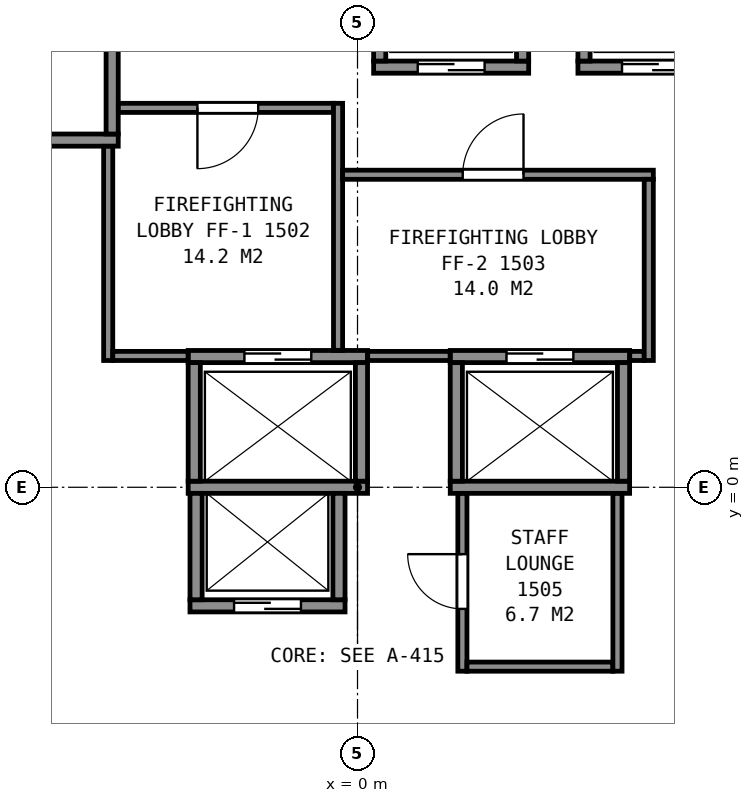
"""IFC4 building model, lengths in metres.
Left out: names, types, materials, properties, quantities, classifications, styles, units other than length and angle.
Written with IfcOpenShell. Run it as: python <this file> out.ifc"""

import sys

from ifc_helpers import new_model, si_unit, direction, frame, frame_2d, origin, place, context, subcontext, project, spatial, rectangle, extrude, element, fill, save


model = new_model("IFC4")
c1 = context("Model", 3, precision=1e-05, world=origin(), true_north=direction((0.0, 1.0)))
c2 = subcontext(c1, "Body", "Model", "MODEL_VIEW")
j1 = project(units=[si_unit("LENGTHUNIT", "METRE"), si_unit("PLANEANGLEUNIT", "RADIAN")], contexts=[c1])
p1 = place(None, origin())
s1 = spatial("IfcSite", under=j1, at=p1, CompositionType="ELEMENT")
p2 = place(p1, origin())
s2 = spatial("IfcBuilding", under=s1, at=p2, CompositionType="ELEMENT")
p3 = place(p2, frame((0.0, 0.0, 69.2)))
s3 = spatial("IfcBuildingStorey", under=s2, at=p3, CompositionType="ELEMENT", Elevation=69.2)
p4 = place(p3, frame((-2.755, -1.95, 0.0), z_axis=(0.0, 0.0, 1.0), x_axis=(1.0, 0.0, 0.0)))
e1 = element("IfcWall", 1, at=p4, inside=s3, PredefinedType="PARTITIONING", context=c2, shape_type="SweptSolid", body=[
    extrude(rectangle(XDim=2.55, YDim=0.2, at=frame_2d((1.275, 0.0))), origin(), (0.0, 0.0, 1.0), 3.6),
])
p5 = place(p4, frame((0.725, 0.0, 0.0)))
e2 = element("IfcOpeningElement", 2, at=p5, cuts=e1, PredefinedType="OPENING", context=c2, shape_type="SweptSolid", body=[
    extrude(rectangle(XDim=1.1, YDim=2.1, at=frame_2d((0.55, 1.05))), frame((0.0, 0.11, 0.0), z_axis=(0.0, -1.0, 0.0), x_axis=(1.0, 0.0, 0.0)), (0.0, 0.0, 1.0), 0.22),
])
p6 = place(p3, frame((-2.785, 0.0, 0.0), z_axis=(0.0, 0.0, 1.0), x_axis=(1.0, 0.0, 0.0)))
e3 = element("IfcWall", 3, at=p6, inside=s3, PredefinedType="PARTITIONING", context=c2, shape_type="SweptSolid", body=[
    extrude(rectangle(XDim=2.95, YDim=0.2, at=frame_2d((1.475, 0.0))), origin(), (0.0, 0.0, 1.0), 3.6),
])
p7 = place(p3, frame((1.525, 0.0, 0.0), z_axis=(0.0, 0.0, 1.0), x_axis=(1.0, 0.0, 0.0)))
e4 = element("IfcWall", 4, at=p7, inside=s3, PredefinedType="PARTITIONING", context=c2, shape_type="SweptSolid", body=[
    extrude(rectangle(XDim=2.95, YDim=0.2, at=frame_2d((1.475, 0.0))), origin(), (0.0, 0.0, 1.0), 3.6),
])
p8 = place(p3, frame((-2.785, 2.15, 0.0), z_axis=(0.0, 0.0, 1.0), x_axis=(1.0, 0.0, 0.0)))
e5 = element("IfcWall", 5, at=p8, inside=s3, PredefinedType="PARTITIONING", context=c2, shape_type="SweptSolid", body=[
    extrude(rectangle(XDim=2.95, YDim=0.2, at=frame_2d((1.475, 0.0))), origin(), (0.0, 0.0, 1.0), 3.6),
])
p9 = place(p8, frame((0.925, 0.0, 0.0)))
e6 = element("IfcOpeningElement", 6, at=p9, cuts=e5, PredefinedType="OPENING", context=c2, shape_type="SweptSolid", body=[
    extrude(rectangle(XDim=1.1, YDim=2.1, at=frame_2d((0.55, 1.05))), frame((0.0, 0.11, 0.0), z_axis=(0.0, -1.0, 0.0), x_axis=(1.0, 0.0, 0.0)), (0.0, 0.0, 1.0), 0.22),
])
p10 = place(p3, frame((1.525, 2.15, 0.0), z_axis=(0.0, 0.0, 1.0), x_axis=(1.0, 0.0, 0.0)))
e7 = element("IfcWall", 7, at=p10, inside=s3, PredefinedType="PARTITIONING", context=c2, shape_type="SweptSolid", body=[
    extrude(rectangle(XDim=2.95, YDim=0.2, at=frame_2d((1.475, 0.0))), origin(), (0.0, 0.0, 1.0), 3.6),
])
p11 = place(p10, frame((0.925, 0.0, 0.0)))
e8 = element("IfcOpeningElement", 8, at=p11, cuts=e7, PredefinedType="OPENING", context=c2, shape_type="SweptSolid", body=[
    extrude(rectangle(XDim=1.1, YDim=2.1, at=frame_2d((0.55, 1.05))), frame((0.0, 0.11, 0.0), z_axis=(0.0, -1.0, 0.0), x_axis=(1.0, 0.0, 0.0)), (0.0, 0.0, 1.0), 0.22),
])
p12 = place(p3, frame((-6.285, 5.71, 0.0), z_axis=(0.0, 0.0, 1.0), x_axis=(1.0, 0.0, 0.0)))
e9 = element("IfcWall", 9, at=p12, inside=s3, PredefinedType="PARTITIONING", context=c2, shape_type="SweptSolid", body=[
    extrude(rectangle(XDim=2.35, YDim=0.2, at=frame_2d((1.175, 0.0))), origin(), (0.0, 0.0, 1.0), 3.6),
])
p13 = place(p3, frame((0.265, 6.91, 0.0), z_axis=(0.0, 0.0, 1.0), x_axis=(1.0, 0.0, 0.0)))
e10 = element("IfcWall", 10, at=p13, inside=s3, PredefinedType="PARTITIONING", context=c2, shape_type="SweptSolid", body=[
    extrude(rectangle(XDim=2.55, YDim=0.2, at=frame_2d((1.275, 0.0))), origin(), (0.0, 0.0, 1.0), 3.6),
])
p14 = place(p13, frame((0.725, 0.0, 0.0)))
e11 = element("IfcOpeningElement", 11, at=p14, cuts=e10, PredefinedType="OPENING", context=c2, shape_type="SweptSolid", body=[
    extrude(rectangle(XDim=1.1, YDim=2.1, at=frame_2d((0.55, 1.05))), frame((0.0, 0.11, 0.0), z_axis=(0.0, -1.0, 0.0), x_axis=(1.0, 0.0, 0.0)), (0.0, 0.0, 1.0), 0.22),
])
p15 = place(p3, frame((3.625, 6.91, 0.0), z_axis=(0.0, 0.0, 1.0), x_axis=(1.0, 0.0, 0.0)))
e12 = element("IfcWall", 12, at=p15, inside=s3, PredefinedType="PARTITIONING", context=c2, shape_type="SweptSolid", body=[
    extrude(rectangle(XDim=2.55, YDim=0.2, at=frame_2d((1.275, 0.0))), origin(), (0.0, 0.0, 1.0), 3.6),
])
p16 = place(p15, frame((0.725, 0.0, 0.0)))
e13 = element("IfcOpeningElement", 13, at=p16, cuts=e12, PredefinedType="OPENING", context=c2, shape_type="SweptSolid", body=[
    extrude(rectangle(XDim=1.1, YDim=2.1, at=frame_2d((0.55, 1.05))), frame((0.0, 0.11, 0.0), z_axis=(0.0, -1.0, 0.0), x_axis=(1.0, 0.0, 0.0)), (0.0, 0.0, 1.0), 0.22),
])
p17 = place(p3, frame((4.375, 0.1, 0.0), z_axis=(0.0, 0.0, 1.0), x_axis=(0.0, 1.0, 0.0)))
e14 = element("IfcWall", 14, at=p17, inside=s3, PredefinedType="PARTITIONING", context=c2, shape_type="SweptSolid", body=[
    extrude(rectangle(XDim=1.95, YDim=0.2, at=frame_2d((0.975, 0.0))), origin(), (0.0, 0.0, 1.0), 3.6),
])
for number, where, z_axis, x_axis in (
    (15, (3.725, 7.01, 0.0), (0.0, 0.0, 1.0), (0.0, 1.0, 0.0)),
    (16, (2.715, 7.01, 0.0), (0.0, 0.0, 1.0), (0.0, 1.0, 0.0)),
):
    element("IfcWall", number, at=place(p3, frame(where, z_axis=z_axis, x_axis=x_axis)), inside=s3, PredefinedType="PARTITIONING", context=c2, shape_type="SweptSolid", body=[
        extrude(rectangle(XDim=1.75, YDim=0.2, at=frame_2d((0.875, 0.0))), origin(), (0.0, 0.0, 1.0), 3.6),
    ])
p18 = place(p3, frame((1.625, 0.1, 0.0), z_axis=(0.0, 0.0, 1.0), x_axis=(0.0, 1.0, 0.0)))
e17 = element("IfcWall", 17, at=p18, inside=s3, PredefinedType="PARTITIONING", context=c2, shape_type="SweptSolid", body=[
    extrude(rectangle(XDim=1.95, YDim=0.2, at=frame_2d((0.975, 0.0))), origin(), (0.0, 0.0, 1.0), 3.6),
])
p19 = place(p3, frame((0.365, 7.01, 0.0), z_axis=(0.0, 0.0, 1.0), x_axis=(0.0, 1.0, 0.0)))
e18 = element("IfcWall", 18, at=p19, inside=s3, PredefinedType="PARTITIONING", context=c2, shape_type="SweptSolid", body=[
    extrude(rectangle(XDim=1.75, YDim=0.2, at=frame_2d((0.875, 0.0))), origin(), (0.0, 0.0, 1.0), 3.6),
])
p20 = place(p3, frame((0.065, 0.1, 0.0), z_axis=(0.0, 0.0, 1.0), x_axis=(0.0, 1.0, 0.0)))
e19 = element("IfcWall", 19, at=p20, inside=s3, PredefinedType="PARTITIONING", context=c2, shape_type="SweptSolid", body=[
    extrude(rectangle(XDim=1.95, YDim=0.2, at=frame_2d((0.975, 0.0))), origin(), (0.0, 0.0, 1.0), 3.6),
])
for number, where, z_axis, x_axis in (
    (20, (-0.305, -1.85, 0.0), (0.0, 0.0, 1.0), (0.0, 1.0, 0.0)),
    (21, (-2.655, -1.85, 0.0), (0.0, 0.0, 1.0), (0.0, 1.0, 0.0)),
):
    element("IfcWall", number, at=place(p3, frame(where, z_axis=z_axis, x_axis=x_axis)), inside=s3, PredefinedType="PARTITIONING", context=c2, shape_type="SweptSolid", body=[
        extrude(rectangle(XDim=1.75, YDim=0.2, at=frame_2d((0.875, 0.0))), origin(), (0.0, 0.0, 1.0), 3.6),
    ])
p21 = place(p3, frame((-2.685, 0.1, 0.0), z_axis=(0.0, 0.0, 1.0), x_axis=(0.0, 1.0, 0.0)))
e22 = element("IfcWall", 22, at=p21, inside=s3, PredefinedType="PARTITIONING", context=c2, shape_type="SweptSolid", body=[
    extrude(rectangle(XDim=1.95, YDim=0.2, at=frame_2d((0.975, 0.0))), origin(), (0.0, 0.0, 1.0), 3.6),
])
p22 = place(p3, frame((-4.035, 5.81, 0.0), z_axis=(0.0, 0.0, 1.0), x_axis=(0.0, 1.0, 0.0)))
e23 = element("IfcWall", 23, at=p22, inside=s3, PredefinedType="PARTITIONING", context=c2, shape_type="SweptSolid", body=[
    extrude(rectangle(XDim=1.75, YDim=0.2, at=frame_2d((0.875, 0.0))), origin(), (0.0, 0.0, 1.0), 3.6),
])
p23 = place(p3, frame((-13.664, 5.946, 0.0), z_axis=(0.0, 0.0, 1.0), x_axis=(0.499994327219, -0.866028678941, 0.0)))
e24 = element("IfcWall", 24, at=p23, inside=s3, PredefinedType="PARTITIONING", context=c2, shape_type="SweptSolid", body=[
    extrude(rectangle(XDim=23.968, YDim=0.2, at=frame_2d((11.984, 0.0))), origin(), (0.0, 0.0, 1.0), 3.35),
])
p24 = place(p3, frame((-4.152, -5.729, 0.0), z_axis=(0.0, 0.0, 1.0), x_axis=(-0.500024287448, 0.866011380966, 0.0)))
e25 = element("IfcWall", 25, at=p24, inside=s3, PredefinedType="PARTITIONING", context=c2, shape_type="SweptSolid", body=[
    extrude(rectangle(XDim=3.501, YDim=0.15, at=frame_2d((1.75, 0.0))), origin(), (0.0, 0.0, 1.0), 3.35),
])
p25 = place(p24, frame((2.026, 0.0, 0.0)))
e26 = element("IfcOpeningElement", 26, at=p25, cuts=e25, PredefinedType="OPENING", context=c2, shape_type="SweptSolid", body=[
    extrude(rectangle(XDim=0.9, YDim=2.1, at=frame_2d((0.45, 1.05))), frame((0.0, 0.085, 0.0), z_axis=(0.0, -1.0, 0.0), x_axis=(1.0, 0.0, 0.0)), (0.0, 0.0, 1.0), 0.17),
])
p26 = place(p24, frame((0.248, 0.0, 0.0)))
e27 = element("IfcOpeningElement", 27, at=p26, cuts=e25, PredefinedType="OPENING", context=c2, shape_type="SweptSolid", body=[
    extrude(rectangle(XDim=0.9, YDim=2.1, at=frame_2d((0.45, 1.05))), frame((0.0, 0.085, 0.0), z_axis=(0.0, -1.0, 0.0), x_axis=(1.0, 0.0, 0.0)), (0.0, 0.0, 1.0), 0.17),
])
p27 = place(p3, frame((-4.1, 2.085, 0.0), z_axis=(0.0, 0.0, 1.0), x_axis=(0.0, 1.0, 0.0)))
e28 = element("IfcWall", 28, at=p27, inside=s3, PredefinedType="PARTITIONING", context=c2, shape_type="SweptSolid", body=[
    extrude(rectangle(XDim=3.523, YDim=0.15, at=frame_2d((1.761, 0.0))), origin(), (0.0, 0.0, 1.0), 3.35),
])
p28 = place(p3, frame((-4.025, 2.16, 0.0), z_axis=(0.0, 0.0, 1.0), x_axis=(1.0, 0.0, 0.0)))
e29 = element("IfcWall", 29, at=p28, inside=s3, PredefinedType="PARTITIONING", context=c2, shape_type="SweptSolid", body=[
    extrude(rectangle(XDim=1.238, YDim=0.15, at=frame_2d((0.619, 0.0))), origin(), (0.0, 0.0, 1.0), 3.35),
])
p29 = place(p3, frame((-3.933, 6.24, 0.0), z_axis=(0.0, 0.0, 1.0), x_axis=(1.0, 0.0, 0.0)))
e30 = element("IfcWall", 30, at=p29, inside=s3, PredefinedType="PARTITIONING", context=c2, shape_type="SweptSolid", body=[
    extrude(rectangle(XDim=3.538, YDim=0.15, at=frame_2d((1.769, 0.0))), origin(), (0.0, 0.0, 1.0), 3.35),
])
p30 = place(p29, frame((1.3, 0.0, 0.0)))
e31 = element("IfcOpeningElement", 31, at=p30, cuts=e30, PredefinedType="OPENING", context=c2, shape_type="SweptSolid", body=[
    extrude(rectangle(XDim=1.0, YDim=2.1, at=frame_2d((0.5, 1.05))), frame((0.0, 0.085, 0.0), z_axis=(0.0, -1.0, 0.0), x_axis=(1.0, 0.0, 0.0)), (0.0, 0.0, 1.0), 0.17),
])
p31 = place(p3, frame((-0.32, 2.252, 0.0), z_axis=(0.0, 0.0, 1.0), x_axis=(0.0, 1.0, 0.0)))
e32 = element("IfcWall", 32, at=p31, inside=s3, PredefinedType="PARTITIONING", context=c2, shape_type="SweptSolid", body=[
    extrude(rectangle(XDim=4.063, YDim=0.15, at=frame_2d((2.031, 0.0))), origin(), (0.0, 0.0, 1.0), 3.35),
])
p32 = place(p3, frame((-0.245, 5.14, 0.0), z_axis=(0.0, 0.0, 1.0), x_axis=(1.0, 0.0, 0.0)))
e33 = element("IfcWall", 33, at=p32, inside=s3, PredefinedType="PARTITIONING", context=c2, shape_type="SweptSolid", body=[
    extrude(rectangle(XDim=5.11, YDim=0.15, at=frame_2d((2.555, 0.0))), origin(), (0.0, 0.0, 1.0), 3.35),
])
p33 = place(p32, frame((1.975, 0.0, 0.0)))
e34 = element("IfcOpeningElement", 34, at=p33, cuts=e33, PredefinedType="OPENING", context=c2, shape_type="SweptSolid", body=[
    extrude(rectangle(XDim=1.0, YDim=2.1, at=frame_2d((0.5, 1.05))), frame((0.0, 0.085, 0.0), z_axis=(0.0, -1.0, 0.0), x_axis=(1.0, 0.0, 0.0)), (0.0, 0.0, 1.0), 0.17),
])
p34 = place(p3, frame((0.167, 2.16, 0.0), z_axis=(0.0, 0.0, 1.0), x_axis=(1.0, 0.0, 0.0)))
e35 = element("IfcWall", 35, at=p34, inside=s3, PredefinedType="PARTITIONING", context=c2, shape_type="SweptSolid", body=[
    extrude(rectangle(XDim=1.356, YDim=0.15, at=frame_2d((0.678, 0.0))), origin(), (0.0, 0.0, 1.0), 3.35),
])
p35 = place(p3, frame((1.725, -0.102, 0.0), z_axis=(0.0, 0.0, 1.0), x_axis=(0.0, -1.0, 0.0)))
e36 = element("IfcWall", 36, at=p35, inside=s3, PredefinedType="PARTITIONING", context=c2, shape_type="SweptSolid", body=[
    extrude(rectangle(XDim=2.923, YDim=0.15, at=frame_2d((1.461, 0.0))), origin(), (0.0, 0.0, 1.0), 3.35),
])
p36 = place(p35, frame((0.998, 0.0, 0.0)))
e37 = element("IfcOpeningElement", 37, at=p36, cuts=e36, PredefinedType="OPENING", context=c2, shape_type="SweptSolid", body=[
    extrude(rectangle(XDim=0.9, YDim=2.1, at=frame_2d((0.45, 1.05))), frame((0.0, 0.085, 0.0), z_axis=(0.0, -1.0, 0.0), x_axis=(1.0, 0.0, 0.0)), (0.0, 0.0, 1.0), 0.17),
])
p37 = place(p3, frame((1.8, -2.95, 0.0), z_axis=(0.0, 0.0, 1.0), x_axis=(1.0, 0.0, 0.0)))
e38 = element("IfcWall", 38, at=p37, inside=s3, PredefinedType="PARTITIONING", context=c2, shape_type="SweptSolid", body=[
    extrude(rectangle(XDim=2.4, YDim=0.15, at=frame_2d((1.2, 0.0))), origin(), (0.0, 0.0, 1.0), 3.35),
])
p38 = place(p3, frame((4.275, -3.025, 0.0), z_axis=(0.0, 0.0, 1.0), x_axis=(0.0, 1.0, 0.0)))
e39 = element("IfcWall", 39, at=p38, inside=s3, PredefinedType="PARTITIONING", context=c2, shape_type="SweptSolid", body=[
    extrude(rectangle(XDim=2.923, YDim=0.15, at=frame_2d((1.461, 0.0))), origin(), (0.0, 0.0, 1.0), 3.35),
])
p39 = place(p3, frame((4.477, 2.16, 0.0), z_axis=(0.0, 0.0, 1.0), x_axis=(1.0, 0.0, 0.0)))
e40 = element("IfcWall", 40, at=p39, inside=s3, PredefinedType="PARTITIONING", context=c2, shape_type="SweptSolid", body=[
    extrude(rectangle(XDim=0.238, YDim=0.15, at=frame_2d((0.119, 0.0))), origin(), (0.0, 0.0, 1.0), 3.35),
])
p40 = place(p3, frame((4.79, 2.085, 0.0), z_axis=(0.0, 0.0, 1.0), x_axis=(0.0, 1.0, 0.0)))
e41 = element("IfcWall", 41, at=p40, inside=s3, PredefinedType="PARTITIONING", context=c2, shape_type="SweptSolid", body=[
    extrude(rectangle(XDim=2.98, YDim=0.15, at=frame_2d((1.49, 0.0))), origin(), (0.0, 0.0, 1.0), 3.35),
])
p41 = place(p3, frame((-3.766, -18.358, 0.0), z_axis=(0.0, 0.0, 1.0), x_axis=(-0.500003973642, 0.866023109589, 0.0)))
e42 = element("IfcWall", 42, at=p41, inside=s3, PredefinedType="PARTITIONING", context=c2, shape_type="SweptSolid", body=[
    extrude(rectangle(XDim=28.826, YDim=0.125, at=frame_2d((14.413, 0.0))), origin(), (0.0, 0.0, 1.0), 2.613),
])
p42 = place(p41, frame((27.114, 0.0, 0.0)))
e43 = element("IfcOpeningElement", 43, at=p42, cuts=e42, PredefinedType="OPENING", context=c2, shape_type="SweptSolid", body=[
    extrude(rectangle(XDim=0.9, YDim=2.1, at=frame_2d((0.45, 1.05))), frame((0.0, 0.073, 0.0), z_axis=(0.0, -1.0, 0.0), x_axis=(1.0, 0.0, 0.0)), (0.0, 0.0, 1.0), 0.145),
])
p43 = place(p41, frame((20.322, 0.0, 0.0)))
e44 = element("IfcOpeningElement", 44, at=p43, cuts=e42, PredefinedType="OPENING", context=c2, shape_type="SweptSolid", body=[
    extrude(rectangle(XDim=0.9, YDim=2.1, at=frame_2d((0.45, 1.05))), frame((0.0, 0.073, 0.0), z_axis=(0.0, -1.0, 0.0), x_axis=(1.0, 0.0, 0.0)), (0.0, 0.0, 1.0), 0.145),
])
p44 = place(p41, frame((17.68, 0.0, 0.0)))
e45 = element("IfcOpeningElement", 45, at=p44, cuts=e42, PredefinedType="OPENING", context=c2, shape_type="SweptSolid", body=[
    extrude(rectangle(XDim=0.9, YDim=2.1, at=frame_2d((0.45, 1.05))), frame((0.0, 0.073, 0.0), z_axis=(0.0, -1.0, 0.0), x_axis=(1.0, 0.0, 0.0)), (0.0, 0.0, 1.0), 0.145),
])
p45 = place(p41, frame((10.836, 0.0, 0.0)))
e46 = element("IfcOpeningElement", 46, at=p45, cuts=e42, PredefinedType="OPENING", context=c2, shape_type="SweptSolid", body=[
    extrude(rectangle(XDim=0.9, YDim=2.1, at=frame_2d((0.45, 1.05))), frame((0.0, 0.073, 0.0), z_axis=(0.0, -1.0, 0.0), x_axis=(1.0, 0.0, 0.0)), (0.0, 0.0, 1.0), 0.145),
])
p46 = place(p41, frame((7.342, 0.0, 0.0)))
e47 = element("IfcOpeningElement", 47, at=p46, cuts=e42, PredefinedType="OPENING", context=c2, shape_type="SweptSolid", body=[
    extrude(rectangle(XDim=0.9, YDim=2.1, at=frame_2d((0.45, 1.05))), frame((0.0, 0.073, 0.0), z_axis=(0.0, -1.0, 0.0), x_axis=(1.0, 0.0, 0.0)), (0.0, 0.0, 1.0), 0.145),
])
p47 = place(p3, frame((18.179, 6.606, 0.0), z_axis=(0.0, 0.0, 1.0), x_axis=(-0.500003973642, -0.866023109589, 0.0)))
e48 = element("IfcWall", 48, at=p47, inside=s3, PredefinedType="PARTITIONING", context=c2, shape_type="SweptSolid", body=[
    extrude(rectangle(XDim=28.826, YDim=0.125, at=frame_2d((14.413, 0.0))), origin(), (0.0, 0.0, 1.0), 2.613),
])
p48 = place(p47, frame((21.501, 0.0, 0.0)))
e49 = element("IfcOpeningElement", 49, at=p48, cuts=e48, PredefinedType="OPENING", context=c2, shape_type="SweptSolid", body=[
    extrude(rectangle(XDim=0.9, YDim=2.1, at=frame_2d((0.45, 1.05))), frame((0.0, 0.073, 0.0), z_axis=(0.0, -1.0, 0.0), x_axis=(1.0, 0.0, 0.0)), (0.0, 0.0, 1.0), 0.145),
])
p49 = place(p47, frame((18.894, 0.0, 0.0)))
e50 = element("IfcOpeningElement", 50, at=p49, cuts=e48, PredefinedType="OPENING", context=c2, shape_type="SweptSolid", body=[
    extrude(rectangle(XDim=0.9, YDim=2.1, at=frame_2d((0.45, 1.05))), frame((0.0, 0.073, 0.0), z_axis=(0.0, -1.0, 0.0), x_axis=(1.0, 0.0, 0.0)), (0.0, 0.0, 1.0), 0.145),
])
p50 = place(p47, frame((10.937, 0.0, 0.0)))
e51 = element("IfcOpeningElement", 51, at=p50, cuts=e48, PredefinedType="OPENING", context=c2, shape_type="SweptSolid", body=[
    extrude(rectangle(XDim=0.9, YDim=2.1, at=frame_2d((0.45, 1.05))), frame((0.0, 0.073, 0.0), z_axis=(0.0, -1.0, 0.0), x_axis=(1.0, 0.0, 0.0)), (0.0, 0.0, 1.0), 0.145),
])
p51 = place(p47, frame((7.535, 0.0, 0.0)))
e52 = element("IfcOpeningElement", 52, at=p51, cuts=e48, PredefinedType="OPENING", context=c2, shape_type="SweptSolid", body=[
    extrude(rectangle(XDim=0.9, YDim=2.1, at=frame_2d((0.45, 1.05))), frame((0.0, 0.073, 0.0), z_axis=(0.0, -1.0, 0.0), x_axis=(1.0, 0.0, 0.0)), (0.0, 0.0, 1.0), 0.145),
])
p52 = place(p47, frame((0.827, 0.0, 0.0)))
e53 = element("IfcOpeningElement", 53, at=p52, cuts=e48, PredefinedType="OPENING", context=c2, shape_type="SweptSolid", body=[
    extrude(rectangle(XDim=0.9, YDim=2.1, at=frame_2d((0.45, 1.05))), frame((0.0, 0.073, 0.0), z_axis=(0.0, -1.0, 0.0), x_axis=(1.0, 0.0, 0.0)), (0.0, 0.0, 1.0), 0.145),
])
p53 = place(p14, origin())
e54 = element("IfcDoor", 54, at=p53, inside=s3, OperationType="SLIDING_TO_LEFT", PredefinedType="DOOR", context=c2, shape_type="SweptSolid", body=[
    extrude(rectangle(XDim=1.1, YDim=2.1, at=frame_2d((0.55, 1.05))), frame((0.0, 0.025, 0.0), z_axis=(0.0, -1.0, 0.0), x_axis=(1.0, 0.0, 0.0)), (0.0, 0.0, 1.0), 0.05),
])
fill(e11, e54)
p54 = place(p5, origin())
e55 = element("IfcDoor", 55, at=p54, inside=s3, OperationType="SLIDING_TO_RIGHT", PredefinedType="DOOR", context=c2, shape_type="SweptSolid", body=[
    extrude(rectangle(XDim=1.1, YDim=2.1, at=frame_2d((0.55, 1.05))), frame((0.0, 0.025, 0.0), z_axis=(0.0, -1.0, 0.0), x_axis=(1.0, 0.0, 0.0)), (0.0, 0.0, 1.0), 0.05),
])
fill(e2, e55)
p55 = place(p16, origin())
e56 = element("IfcDoor", 56, at=p55, inside=s3, OperationType="SLIDING_TO_LEFT", PredefinedType="DOOR", context=c2, shape_type="SweptSolid", body=[
    extrude(rectangle(XDim=1.1, YDim=2.1, at=frame_2d((0.55, 1.05))), frame((0.0, 0.025, 0.0), z_axis=(0.0, -1.0, 0.0), x_axis=(1.0, 0.0, 0.0)), (0.0, 0.0, 1.0), 0.05),
])
fill(e13, e56)
p56 = place(p9, origin())
e57 = element("IfcDoor", 57, at=p56, inside=s3, OperationType="SLIDING_TO_LEFT", PredefinedType="DOOR", context=c2, shape_type="SweptSolid", body=[
    extrude(rectangle(XDim=1.1, YDim=2.1, at=frame_2d((0.55, 1.05))), frame((0.0, 0.025, 0.0), z_axis=(0.0, -1.0, 0.0), x_axis=(1.0, 0.0, 0.0)), (0.0, 0.0, 1.0), 0.05),
])
fill(e6, e57)
p57 = place(p11, origin())
e58 = element("IfcDoor", 58, at=p57, inside=s3, OperationType="SLIDING_TO_RIGHT", PredefinedType="DOOR", context=c2, shape_type="SweptSolid", body=[
    extrude(rectangle(XDim=1.1, YDim=2.1, at=frame_2d((0.55, 1.05))), frame((0.0, 0.025, 0.0), z_axis=(0.0, -1.0, 0.0), x_axis=(1.0, 0.0, 0.0)), (0.0, 0.0, 1.0), 0.05),
])
fill(e8, e58)
p58 = place(p30, origin())
e59 = element("IfcDoor", 59, at=p58, inside=s3, OperationType="SINGLE_SWING_LEFT", PredefinedType="DOOR", context=c2, shape_type="SweptSolid", body=[
    extrude(rectangle(XDim=1.0, YDim=2.1, at=frame_2d((0.5, 1.05))), frame((0.0, 0.025, 0.0), z_axis=(0.0, -1.0, 0.0), x_axis=(1.0, 0.0, 0.0)), (0.0, 0.0, 1.0), 0.05),
])
fill(e31, e59)
p59 = place(p33, origin())
e60 = element("IfcDoor", 60, at=p59, inside=s3, OperationType="SINGLE_SWING_RIGHT", PredefinedType="DOOR", context=c2, shape_type="SweptSolid", body=[
    extrude(rectangle(XDim=1.0, YDim=2.1, at=frame_2d((0.5, 1.05))), frame((0.0, 0.025, 0.0), z_axis=(0.0, -1.0, 0.0), x_axis=(1.0, 0.0, 0.0)), (0.0, 0.0, 1.0), 0.05),
])
fill(e34, e60)
p60 = place(p36, origin())
e61 = element("IfcDoor", 61, at=p60, inside=s3, OperationType="SINGLE_SWING_LEFT", PredefinedType="DOOR", context=c2, shape_type="SweptSolid", body=[
    extrude(rectangle(XDim=0.9, YDim=2.1, at=frame_2d((0.45, 1.05))), frame((0.0, 0.025, 0.0), z_axis=(0.0, -1.0, 0.0), x_axis=(1.0, 0.0, 0.0)), (0.0, 0.0, 1.0), 0.05),
])
fill(e37, e61)
save(model, sys.argv[1])
